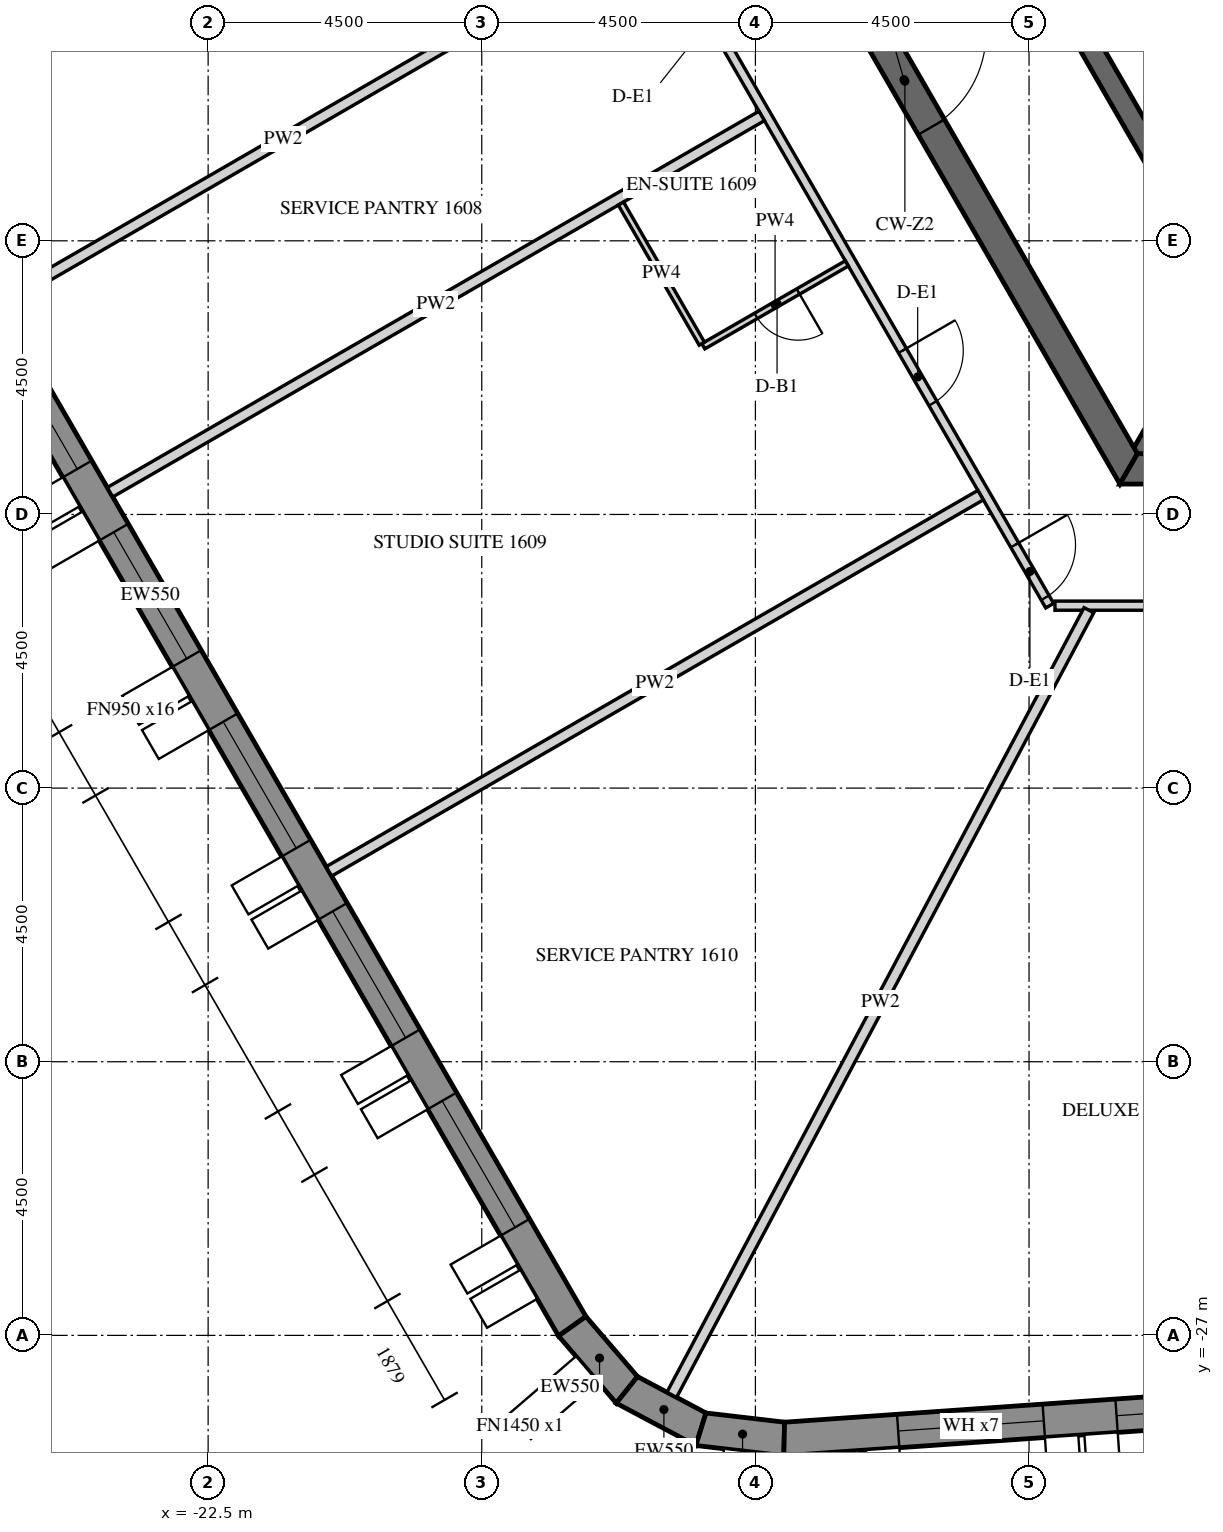
"""IFC4 building model, lengths in metres.
Left out: names, types, materials, properties, quantities, classifications, styles, units other than length and angle.
Written with IfcOpenShell. Run it as: python <this file> out.ifc"""

import sys

from ifc_helpers import new_model, si_unit, direction, frame, frame_2d, origin, place, context, subcontext, project, spatial, polyline, rectangle, outline, extrude, element, fill, save


model = new_model("IFC4")
c1 = context("Model", 3, precision=1e-05, world=origin(), true_north=direction((0.0, 1.0)))
c2 = subcontext(c1, "Body", "Model", "MODEL_VIEW")
j1 = project(units=[si_unit("LENGTHUNIT", "METRE"), si_unit("PLANEANGLEUNIT", "RADIAN")], contexts=[c1])
p1 = place(None, origin())
s1 = spatial("IfcSite", under=j1, at=p1, CompositionType="ELEMENT")
p2 = place(p1, origin())
s2 = spatial("IfcBuilding", under=s1, at=p2, CompositionType="ELEMENT")
p3 = place(p2, frame((0.0, 0.0, 207.3)))
s3 = spatial("IfcBuildingStorey", under=s2, at=p3, CompositionType="ELEMENT", Elevation=207.3)
p4 = place(p3, frame((-30.391, -2.811, -0.15), z_axis=(0.0, 0.0, 1.0), x_axis=(0.499998569178, -0.866026229868, 0.0)))
e1 = element("IfcWall", 1, at=p4, inside=s3, PredefinedType="SOLIDWALL", context=c2, shape_type="SweptSolid", body=[
    extrude(outline(polyline([(-0.022, -0.275), (27.783, -0.275), (27.732, 0.275), (0.022, 0.275), (-0.022, -0.275)])), origin(), (0.0, 0.0, 1.0), 3.9),
])
p5 = place(p4, frame((1.879, 0.0, 1.05)))
e2 = element("IfcOpeningElement", 2, at=p5, cuts=e1, PredefinedType="OPENING", context=c2, shape_type="SweptSolid", body=[
    extrude(rectangle(XDim=2.4, YDim=2.4, at=frame_2d((1.2, 1.2))), frame((0.0, 0.285, 0.0), z_axis=(0.0, -1.0, 0.0), x_axis=(1.0, 0.0, 0.0)), (0.0, 0.0, 1.0), 0.57),
])
p6 = place(p4, frame((5.479, 0.0, 1.05)))
e3 = element("IfcOpeningElement", 3, at=p6, cuts=e1, PredefinedType="OPENING", context=c2, shape_type="SweptSolid", body=[
    extrude(rectangle(XDim=2.4, YDim=2.4, at=frame_2d((1.2, 1.2))), frame((0.0, 0.285, 0.0), z_axis=(0.0, -1.0, 0.0), x_axis=(1.0, 0.0, 0.0)), (0.0, 0.0, 1.0), 0.57),
])
p7 = place(p4, frame((9.079, 0.0, 1.05)))
e4 = element("IfcOpeningElement", 4, at=p7, cuts=e1, PredefinedType="OPENING", context=c2, shape_type="SweptSolid", body=[
    extrude(rectangle(XDim=2.4, YDim=2.4, at=frame_2d((1.2, 1.2))), frame((0.0, 0.285, 0.0), z_axis=(0.0, -1.0, 0.0), x_axis=(1.0, 0.0, 0.0)), (0.0, 0.0, 1.0), 0.57),
])
p8 = place(p4, frame((12.679, 0.0, 1.05)))
e5 = element("IfcOpeningElement", 5, at=p8, cuts=e1, PredefinedType="OPENING", context=c2, shape_type="SweptSolid", body=[
    extrude(rectangle(XDim=2.4, YDim=2.4, at=frame_2d((1.2, 1.2))), frame((0.0, 0.285, 0.0), z_axis=(0.0, -1.0, 0.0), x_axis=(1.0, 0.0, 0.0)), (0.0, 0.0, 1.0), 0.57),
])
p9 = place(p4, frame((16.279, 0.0, 1.05)))
e6 = element("IfcOpeningElement", 6, at=p9, cuts=e1, PredefinedType="OPENING", context=c2, shape_type="SweptSolid", body=[
    extrude(rectangle(XDim=2.4, YDim=2.4, at=frame_2d((1.2, 1.2))), frame((0.0, 0.285, 0.0), z_axis=(0.0, -1.0, 0.0), x_axis=(1.0, 0.0, 0.0)), (0.0, 0.0, 1.0), 0.57),
])
p10 = place(p4, frame((19.879, 0.0, 1.05)))
e7 = element("IfcOpeningElement", 7, at=p10, cuts=e1, PredefinedType="OPENING", context=c2, shape_type="SweptSolid", body=[
    extrude(rectangle(XDim=2.4, YDim=2.4, at=frame_2d((1.2, 1.2))), frame((0.0, 0.285, 0.0), z_axis=(0.0, -1.0, 0.0), x_axis=(1.0, 0.0, 0.0)), (0.0, 0.0, 1.0), 0.57),
])
p11 = place(p4, frame((23.479, 0.0, 1.05)))
e8 = element("IfcOpeningElement", 8, at=p11, cuts=e1, PredefinedType="OPENING", context=c2, shape_type="SweptSolid", body=[
    extrude(rectangle(XDim=2.4, YDim=2.4, at=frame_2d((1.2, 1.2))), frame((0.0, 0.285, 0.0), z_axis=(0.0, -1.0, 0.0), x_axis=(1.0, 0.0, 0.0)), (0.0, 0.0, 1.0), 0.57),
])
p12 = place(p3, frame((-16.512, -26.85, -0.15), z_axis=(0.0, 0.0, 1.0), x_axis=(0.651621950847, -0.758543890078, 0.0)))
e9 = element("IfcWall", 9, at=p12, inside=s3, PredefinedType="SOLIDWALL", context=c2, shape_type="SweptSolid", body=[
    extrude(outline(polyline([(-0.026, -0.275), (1.431, -0.275), (1.327, 0.275), (0.026, 0.275), (-0.026, -0.275)])), origin(), (0.0, 0.0, 1.0), 3.9),
])
p13 = place(p3, frame((-15.614, -27.896, -0.15), z_axis=(0.0, 0.0, 1.0), x_axis=(0.882994189209, -0.469383917304, 0.0)))
e10 = element("IfcWall", 10, at=p13, inside=s3, PredefinedType="SOLIDWALL", context=c2, shape_type="SweptSolid", body=[
    extrude(outline(polyline([(-0.052, -0.275), (1.431, -0.275), (1.327, 0.275), (0.052, 0.275), (-0.052, -0.275)])), origin(), (0.0, 0.0, 1.0), 3.9),
])
p14 = place(p3, frame((-14.396, -28.543, -0.15), z_axis=(0.0, 0.0, 1.0), x_axis=(0.993232537394, -0.11614269956, 0.0)))
e11 = element("IfcWall", 11, at=p14, inside=s3, PredefinedType="SOLIDWALL", context=c2, shape_type="SweptSolid", body=[
    extrude(outline(polyline([(-0.052, -0.275), (1.405, -0.275), (1.353, 0.275), (0.052, 0.275), (-0.052, -0.275)])), origin(), (0.0, 0.0, 1.0), 3.9),
])
p15 = place(p3, frame((-13.026, -28.704, -0.15), z_axis=(0.0, 0.0, 1.0), x_axis=(0.99756406806, 0.069756219185, 0.0)))
e12 = element("IfcWall", 12, at=p15, inside=s3, PredefinedType="SOLIDWALL", context=c2, shape_type="SweptSolid", body=[
    extrude(outline(polyline([(-0.026, -0.275), (27.78, -0.275), (27.735, 0.275), (0.026, 0.275), (-0.026, -0.275)])), origin(), (0.0, 0.0, 1.0), 3.9),
])
p16 = place(p15, frame((1.879, 0.0, 1.05)))
e13 = element("IfcOpeningElement", 13, at=p16, cuts=e12, PredefinedType="OPENING", context=c2, shape_type="SweptSolid", body=[
    extrude(rectangle(XDim=2.4, YDim=2.4, at=frame_2d((1.2, 1.2))), frame((0.0, 0.285, 0.0), z_axis=(0.0, -1.0, 0.0), x_axis=(1.0, 0.0, 0.0)), (0.0, 0.0, 1.0), 0.57),
])
p17 = place(p15, frame((5.479, 0.0, 1.05)))
e14 = element("IfcOpeningElement", 14, at=p17, cuts=e12, PredefinedType="OPENING", context=c2, shape_type="SweptSolid", body=[
    extrude(rectangle(XDim=2.4, YDim=2.4, at=frame_2d((1.2, 1.2))), frame((0.0, 0.285, 0.0), z_axis=(0.0, -1.0, 0.0), x_axis=(1.0, 0.0, 0.0)), (0.0, 0.0, 1.0), 0.57),
])
p18 = place(p15, frame((9.079, 0.0, 1.05)))
e15 = element("IfcOpeningElement", 15, at=p18, cuts=e12, PredefinedType="OPENING", context=c2, shape_type="SweptSolid", body=[
    extrude(rectangle(XDim=2.4, YDim=2.4, at=frame_2d((1.2, 1.2))), frame((0.0, 0.285, 0.0), z_axis=(0.0, -1.0, 0.0), x_axis=(1.0, 0.0, 0.0)), (0.0, 0.0, 1.0), 0.57),
])
p19 = place(p15, frame((12.679, 0.0, 1.05)))
e16 = element("IfcOpeningElement", 16, at=p19, cuts=e12, PredefinedType="OPENING", context=c2, shape_type="SweptSolid", body=[
    extrude(rectangle(XDim=2.4, YDim=2.4, at=frame_2d((1.2, 1.2))), frame((0.0, 0.285, 0.0), z_axis=(0.0, -1.0, 0.0), x_axis=(1.0, 0.0, 0.0)), (0.0, 0.0, 1.0), 0.57),
])
p20 = place(p15, frame((16.279, 0.0, 1.05)))
e17 = element("IfcOpeningElement", 17, at=p20, cuts=e12, PredefinedType="OPENING", context=c2, shape_type="SweptSolid", body=[
    extrude(rectangle(XDim=2.4, YDim=2.4, at=frame_2d((1.2, 1.2))), frame((0.0, 0.285, 0.0), z_axis=(0.0, -1.0, 0.0), x_axis=(1.0, 0.0, 0.0)), (0.0, 0.0, 1.0), 0.57),
])
p21 = place(p15, frame((19.879, 0.0, 1.05)))
e18 = element("IfcOpeningElement", 18, at=p21, cuts=e12, PredefinedType="OPENING", context=c2, shape_type="SweptSolid", body=[
    extrude(rectangle(XDim=2.4, YDim=2.4, at=frame_2d((1.2, 1.2))), frame((0.0, 0.285, 0.0), z_axis=(0.0, -1.0, 0.0), x_axis=(1.0, 0.0, 0.0)), (0.0, 0.0, 1.0), 0.57),
])
p22 = place(p15, frame((23.479, 0.0, 1.05)))
e19 = element("IfcOpeningElement", 19, at=p22, cuts=e12, PredefinedType="OPENING", context=c2, shape_type="SweptSolid", body=[
    extrude(rectangle(XDim=2.4, YDim=2.4, at=frame_2d((1.2, 1.2))), frame((0.0, 0.285, 0.0), z_axis=(0.0, -1.0, 0.0), x_axis=(1.0, 0.0, 0.0)), (0.0, 0.0, 1.0), 0.57),
])
p23 = place(p3, frame((-14.722, 0.0, -0.15), z_axis=(0.0, 0.0, 1.0), x_axis=(0.50000571537, -0.866022103989, 0.0)))
e20 = element("IfcWall", 20, at=p23, inside=s3, PredefinedType="SHEAR", context=c2, shape_type="SweptSolid", body=[
    extrude(outline(polyline([(-0.144, -0.25), (14.867, -0.25), (14.578, 0.25), (0.144, 0.25), (-0.144, -0.25)])), origin(), (0.0, 0.0, 1.0), 3.9),
])
p24 = place(p23, frame((6.432, 0.0, 0.15)))
e21 = element("IfcOpeningElement", 21, at=p24, cuts=e20, PredefinedType="OPENING", context=c2, shape_type="SweptSolid", body=[
    extrude(rectangle(XDim=1.8, YDim=2.4, at=frame_2d((0.9, 1.2))), frame((0.0, 0.26, 0.0), z_axis=(0.0, -1.0, 0.0), x_axis=(1.0, 0.0, 0.0)), (0.0, 0.0, 1.0), 0.52),
])
p25 = place(p3, frame((-7.361, -12.75, -0.15), z_axis=(0.0, 0.0, 1.0), x_axis=(1.0, 0.0, 0.0)))
e22 = element("IfcWall", 22, at=p25, inside=s3, PredefinedType="SHEAR", context=c2, shape_type="SweptSolid", body=[
    extrude(outline(polyline([(-0.144, -0.25), (14.866, -0.25), (14.578, 0.25), (0.144, 0.25), (-0.144, -0.25)])), origin(), (0.0, 0.0, 1.0), 3.9),
])
p26 = place(p25, frame((6.761, 0.0, 0.15)))
e23 = element("IfcOpeningElement", 23, at=p26, cuts=e22, PredefinedType="OPENING", context=c2, shape_type="SweptSolid", body=[
    extrude(rectangle(XDim=1.2, YDim=2.4, at=frame_2d((0.6, 1.2))), frame((0.0, 0.26, 0.0), z_axis=(0.0, -1.0, 0.0), x_axis=(1.0, 0.0, 0.0)), (0.0, 0.0, 1.0), 0.52),
])
p27 = place(p3, frame((-11.345, 0.0, -0.15), z_axis=(0.0, 0.0, 1.0), x_axis=(0.499995046907, -0.866028263435, 0.0)))
e24 = element("IfcWall", 24, at=p27, inside=s3, PredefinedType="SHEAR", context=c2, shape_type="SweptSolid", body=[
    extrude(outline(polyline([(-0.101, -0.175), (11.446, -0.175), (11.244, 0.175), (0.101, 0.175), (-0.101, -0.175)])), origin(), (0.0, 0.0, 1.0), 3.9),
])
p28 = place(p27, frame((4.744, 0.0, 0.15)))
e25 = element("IfcOpeningElement", 25, at=p28, cuts=e24, PredefinedType="OPENING", context=c2, shape_type="SweptSolid", body=[
    extrude(rectangle(XDim=1.8, YDim=2.4, at=frame_2d((0.9, 1.2))), frame((0.0, 0.185, 0.0), z_axis=(0.0, -1.0, 0.0), x_axis=(1.0, 0.0, 0.0)), (0.0, 0.0, 1.0), 0.37),
])
p29 = place(p3, frame((-5.773, -10.0, -0.15), z_axis=(0.0, 0.0, 1.0), x_axis=(-0.499995765644, -0.866027848477, 0.0)))
e26 = element("IfcWall", 26, at=p29, inside=s3, PredefinedType="SHEAR", context=c2, shape_type="SweptSolid", body=[
    extrude(rectangle(XDim=2.887, YDim=0.2, at=frame_2d((1.443, 0.0))), origin(), (0.0, 0.0, 1.0), 3.9),
])
p30 = place(p3, frame((-15.094, -3.856, 0.0), z_axis=(0.0, 0.0, 1.0), x_axis=(0.500006037985, -0.866021917724, 0.0)))
e27 = element("IfcWall", 27, at=p30, inside=s3, PredefinedType="PARTITIONING", context=c2, shape_type="SweptSolid", body=[
    extrude(rectangle(XDim=12.867, YDim=0.15, at=frame_2d((6.434, 0.0))), origin(), (0.0, 0.0, 1.0), 2.988),
])
p31 = place(p30, frame((1.225, 0.0, 0.0)))
e28 = element("IfcOpeningElement", 28, at=p31, cuts=e27, PredefinedType="OPENING", context=c2, shape_type="SweptSolid", body=[
    extrude(rectangle(XDim=1.0, YDim=2.1, at=frame_2d((0.5, 1.05))), frame((0.0, 0.085, 0.0), z_axis=(0.0, -1.0, 0.0), x_axis=(1.0, 0.0, 0.0)), (0.0, 0.0, 1.0), 0.17),
])
p32 = place(p30, frame((8.025, 0.0, 0.0)))
e29 = element("IfcOpeningElement", 29, at=p32, cuts=e27, PredefinedType="OPENING", context=c2, shape_type="SweptSolid", body=[
    extrude(rectangle(XDim=1.0, YDim=2.1, at=frame_2d((0.5, 1.05))), frame((0.0, 0.085, 0.0), z_axis=(0.0, -1.0, 0.0), x_axis=(1.0, 0.0, 0.0)), (0.0, 0.0, 1.0), 0.17),
])
p33 = place(p30, frame((11.717, 0.0, 0.0)))
e30 = element("IfcOpeningElement", 30, at=p33, cuts=e27, PredefinedType="OPENING", context=c2, shape_type="SweptSolid", body=[
    extrude(rectangle(XDim=1.0, YDim=2.1, at=frame_2d((0.5, 1.05))), frame((0.0, 0.085, 0.0), z_axis=(0.0, -1.0, 0.0), x_axis=(1.0, 0.0, 0.0)), (0.0, 0.0, 1.0), 0.17),
])
p34 = place(p3, frame((-8.574, -15.0, 0.0), z_axis=(0.0, 0.0, 1.0), x_axis=(1.0, 0.0, 0.0)))
e31 = element("IfcWall", 31, at=p34, inside=s3, PredefinedType="PARTITIONING", context=c2, shape_type="SweptSolid", body=[
    extrude(rectangle(XDim=14.78, YDim=0.15, at=frame_2d((7.39, 0.0))), origin(), (0.0, 0.0, 1.0), 2.988),
])
p35 = place(p34, frame((1.951, 0.0, 0.0)))
e32 = element("IfcOpeningElement", 32, at=p35, cuts=e31, PredefinedType="OPENING", context=c2, shape_type="SweptSolid", body=[
    extrude(rectangle(XDim=1.0, YDim=2.1, at=frame_2d((0.5, 1.05))), frame((0.0, 0.085, 0.0), z_axis=(0.0, -1.0, 0.0), x_axis=(1.0, 0.0, 0.0)), (0.0, 0.0, 1.0), 0.17),
])
p36 = place(p34, frame((9.085, 0.0, 0.0)))
e33 = element("IfcOpeningElement", 33, at=p36, cuts=e31, PredefinedType="OPENING", context=c2, shape_type="SweptSolid", body=[
    extrude(rectangle(XDim=1.0, YDim=2.1, at=frame_2d((0.5, 1.05))), frame((0.0, 0.085, 0.0), z_axis=(0.0, -1.0, 0.0), x_axis=(1.0, 0.0, 0.0)), (0.0, 0.0, 1.0), 0.17),
])
p37 = place(p3, frame((-25.914, -10.017, 0.0), z_axis=(0.0, 0.0, 1.0), x_axis=(0.86602614826, 0.499998710529, 0.0)))
e34 = element("IfcWall", 34, at=p37, inside=s3, PredefinedType="PARTITIONING", context=c2, shape_type="SweptSolid", body=[
    extrude(rectangle(XDim=10.735, YDim=0.18, at=frame_2d((5.368, 0.0))), origin(), (0.0, 0.0, 1.0), 2.988),
])
p38 = place(p3, frame((-24.114, -13.134, 0.0), z_axis=(0.0, 0.0, 1.0), x_axis=(0.866024931941, 0.500000817256, 0.0)))
e35 = element("IfcWall", 35, at=p38, inside=s3, PredefinedType="PARTITIONING", context=c2, shape_type="SweptSolid", body=[
    extrude(rectangle(XDim=12.375, YDim=0.18, at=frame_2d((6.188, 0.0))), origin(), (0.0, 0.0, 1.0), 2.988),
])
p39 = place(p3, frame((-11.996, -9.372, 0.0), z_axis=(0.0, 0.0, 1.0), x_axis=(-0.866012511928, -0.500022328685, 0.0)))
e36 = element("IfcWall", 36, at=p39, inside=s3, PredefinedType="PARTITIONING", context=c2, shape_type="SweptSolid", body=[
    extrude(rectangle(XDim=2.725, YDim=0.1, at=frame_2d((1.363, 0.0))), origin(), (0.0, 0.0, 1.0), 2.988),
])
p40 = place(p39, frame((0.925, 0.0, 0.0)))
e37 = element("IfcOpeningElement", 37, at=p40, cuts=e36, PredefinedType="OPENING", context=c2, shape_type="SweptSolid", body=[
    extrude(rectangle(XDim=0.8, YDim=2.1, at=frame_2d((0.4, 1.05))), frame((0.0, 0.06, 0.0), z_axis=(0.0, -1.0, 0.0), x_axis=(1.0, 0.0, 0.0)), (0.0, 0.0, 1.0), 0.12),
])
p41 = place(p3, frame((-14.381, -10.691, 0.0), z_axis=(0.0, 0.0, 1.0), x_axis=(-0.500008456887, 0.866020521143, 0.0)))
e38 = element("IfcWall", 38, at=p41, inside=s3, PredefinedType="PARTITIONING", context=c2, shape_type="SweptSolid", body=[
    extrude(rectangle(XDim=2.66, YDim=0.1, at=frame_2d((1.33, 0.0))), origin(), (0.0, 0.0, 1.0), 2.988),
])
p42 = place(p3, frame((-20.513, -19.37, 0.0), z_axis=(0.0, 0.0, 1.0), x_axis=(0.866024931941, 0.500000817256, 0.0)))
e39 = element("IfcWall", 39, at=p42, inside=s3, PredefinedType="PARTITIONING", context=c2, shape_type="SweptSolid", body=[
    extrude(rectangle(XDim=12.375, YDim=0.18, at=frame_2d((6.188, 0.0))), origin(), (0.0, 0.0, 1.0), 2.988),
])
p43 = place(p3, frame((-14.876, -27.977, 0.0), z_axis=(0.0, 0.0, 1.0), x_axis=(0.469468328163, 0.882949312731, 0.0)))
e40 = element("IfcWall", 40, at=p43, inside=s3, PredefinedType="PARTITIONING", context=c2, shape_type="SweptSolid", body=[
    extrude(rectangle(XDim=14.613, YDim=0.18, at=frame_2d((7.306, 0.0))), origin(), (0.0, 0.0, 1.0), 2.988),
])
p44 = place(p7, frame((0.0, 0.205, 0.0)))
e41 = element("IfcWindow", 41, at=p44, inside=s3, PartitioningType="DOUBLE_PANEL_VERTICAL", PredefinedType="WINDOW", context=c2, shape_type="SweptSolid", body=[
    extrude(rectangle(XDim=2.4, YDim=2.4, at=frame_2d((1.2, 1.2))), frame((0.0, 0.03, 0.0), z_axis=(0.0, -1.0, 0.0), x_axis=(1.0, 0.0, 0.0)), (0.0, 0.0, 1.0), 0.06),
])
fill(e4, e41)
p45 = place(p8, frame((0.0, 0.205, 0.0)))
e42 = element("IfcWindow", 42, at=p45, inside=s3, PartitioningType="DOUBLE_PANEL_VERTICAL", PredefinedType="WINDOW", context=c2, shape_type="SweptSolid", body=[
    extrude(rectangle(XDim=2.4, YDim=2.4, at=frame_2d((1.2, 1.2))), frame((0.0, 0.03, 0.0), z_axis=(0.0, -1.0, 0.0), x_axis=(1.0, 0.0, 0.0)), (0.0, 0.0, 1.0), 0.06),
])
fill(e5, e42)
p46 = place(p9, frame((0.0, 0.205, 0.0)))
e43 = element("IfcWindow", 43, at=p46, inside=s3, PartitioningType="DOUBLE_PANEL_VERTICAL", PredefinedType="WINDOW", context=c2, shape_type="SweptSolid", body=[
    extrude(rectangle(XDim=2.4, YDim=2.4, at=frame_2d((1.2, 1.2))), frame((0.0, 0.03, 0.0), z_axis=(0.0, -1.0, 0.0), x_axis=(1.0, 0.0, 0.0)), (0.0, 0.0, 1.0), 0.06),
])
fill(e6, e43)
p47 = place(p10, frame((0.0, 0.205, 0.0)))
e44 = element("IfcWindow", 44, at=p47, inside=s3, PartitioningType="DOUBLE_PANEL_VERTICAL", PredefinedType="WINDOW", context=c2, shape_type="SweptSolid", body=[
    extrude(rectangle(XDim=2.4, YDim=2.4, at=frame_2d((1.2, 1.2))), frame((0.0, 0.03, 0.0), z_axis=(0.0, -1.0, 0.0), x_axis=(1.0, 0.0, 0.0)), (0.0, 0.0, 1.0), 0.06),
])
fill(e7, e44)
p48 = place(p11, frame((0.0, 0.205, 0.0)))
e45 = element("IfcWindow", 45, at=p48, inside=s3, PartitioningType="DOUBLE_PANEL_VERTICAL", PredefinedType="WINDOW", context=c2, shape_type="SweptSolid", body=[
    extrude(rectangle(XDim=2.4, YDim=2.4, at=frame_2d((1.2, 1.2))), frame((0.0, 0.03, 0.0), z_axis=(0.0, -1.0, 0.0), x_axis=(1.0, 0.0, 0.0)), (0.0, 0.0, 1.0), 0.06),
])
fill(e8, e45)
p49 = place(p16, frame((0.0, 0.205, 0.0)))
e46 = element("IfcWindow", 46, at=p49, inside=s3, PartitioningType="DOUBLE_PANEL_VERTICAL", PredefinedType="WINDOW", context=c2, shape_type="SweptSolid", body=[
    extrude(rectangle(XDim=2.4, YDim=2.4, at=frame_2d((1.2, 1.2))), frame((0.0, 0.03, 0.0), z_axis=(0.0, -1.0, 0.0), x_axis=(1.0, 0.0, 0.0)), (0.0, 0.0, 1.0), 0.06),
])
fill(e13, e46)
p50 = place(p17, frame((0.0, 0.205, 0.0)))
e47 = element("IfcWindow", 47, at=p50, inside=s3, PartitioningType="DOUBLE_PANEL_VERTICAL", PredefinedType="WINDOW", context=c2, shape_type="SweptSolid", body=[
    extrude(rectangle(XDim=2.4, YDim=2.4, at=frame_2d((1.2, 1.2))), frame((0.0, 0.03, 0.0), z_axis=(0.0, -1.0, 0.0), x_axis=(1.0, 0.0, 0.0)), (0.0, 0.0, 1.0), 0.06),
])
fill(e14, e47)
p51 = place(p24, origin())
e48 = element("IfcDoor", 48, at=p51, inside=s3, OperationType="DOUBLE_DOOR_SINGLE_SWING", PredefinedType="DOOR", context=c2, shape_type="SweptSolid", body=[
    extrude(rectangle(XDim=1.8, YDim=2.4, at=frame_2d((0.9, 1.2))), frame((0.0, 0.025, 0.0), z_axis=(0.0, -1.0, 0.0), x_axis=(1.0, 0.0, 0.0)), (0.0, 0.0, 1.0), 0.05),
])
fill(e21, e48)
p52 = place(p32, origin())
e49 = element("IfcDoor", 49, at=p52, inside=s3, OperationType="SINGLE_SWING_RIGHT", PredefinedType="DOOR", context=c2, shape_type="SweptSolid", body=[
    extrude(rectangle(XDim=1.0, YDim=2.1, at=frame_2d((0.5, 1.05))), frame((0.0, 0.025, 0.0), z_axis=(0.0, -1.0, 0.0), x_axis=(1.0, 0.0, 0.0)), (0.0, 0.0, 1.0), 0.05),
])
fill(e29, e49)
p53 = place(p40, origin())
e50 = element("IfcDoor", 50, at=p53, inside=s3, OperationType="SINGLE_SWING_RIGHT", PredefinedType="DOOR", context=c2, shape_type="SweptSolid", body=[
    extrude(rectangle(XDim=0.8, YDim=2.1, at=frame_2d((0.4, 1.05))), frame((0.0, 0.025, 0.0), z_axis=(0.0, -1.0, 0.0), x_axis=(1.0, 0.0, 0.0)), (0.0, 0.0, 1.0), 0.05),
])
fill(e37, e50)
p54 = place(p33, origin())
e51 = element("IfcDoor", 51, at=p54, inside=s3, OperationType="SINGLE_SWING_LEFT", PredefinedType="DOOR", context=c2, shape_type="SweptSolid", body=[
    extrude(rectangle(XDim=1.0, YDim=2.1, at=frame_2d((0.5, 1.05))), frame((0.0, 0.025, 0.0), z_axis=(0.0, -1.0, 0.0), x_axis=(1.0, 0.0, 0.0)), (0.0, 0.0, 1.0), 0.05),
])
fill(e30, e51)
save(model, sys.argv[1])
